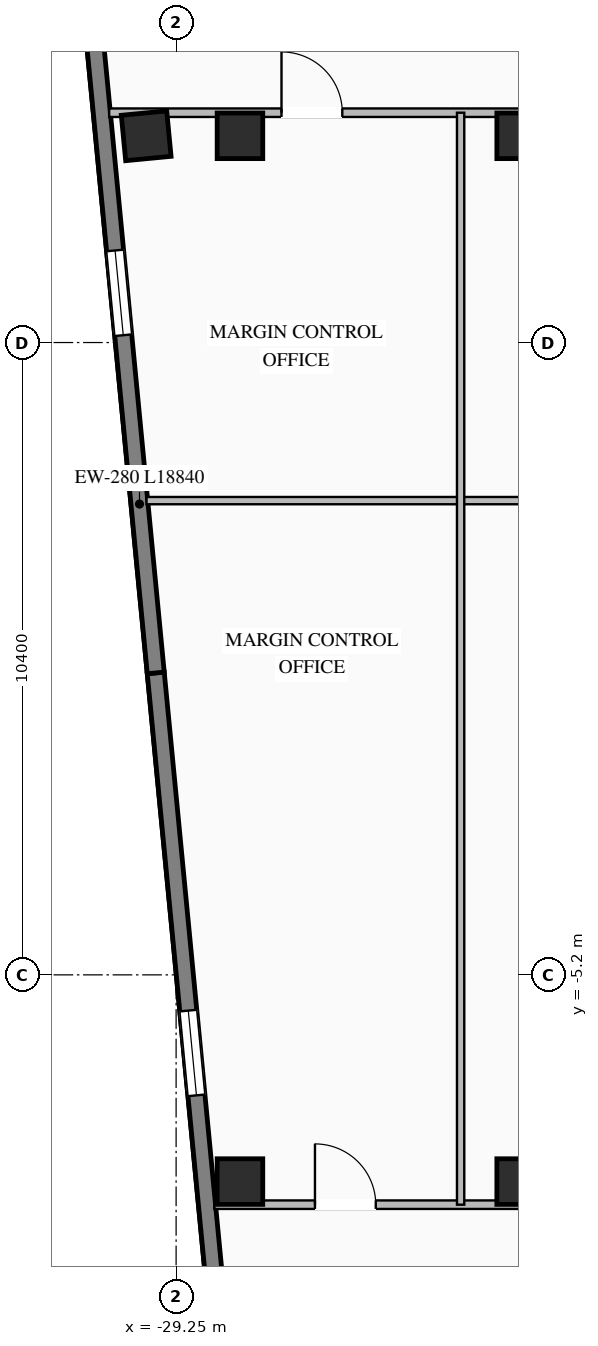
"""IFC4 building model, lengths in metres.
Left out: names, types, materials, properties, quantities, classifications, styles, units other than length and angle.
Written with IfcOpenShell. Run it as: python <this file> out.ifc"""

import sys

from ifc_helpers import new_model, si_unit, direction, frame, frame_2d, origin, origin_2d, place, context, subcontext, project, spatial, rectangle, i_section, extrude, element, fill, save


model = new_model("IFC4")
c1 = context("Model", 3, precision=1e-05, world=origin(), true_north=direction((0.0, 1.0)))
c2 = subcontext(c1, "Body", "Model", "MODEL_VIEW")
j1 = project(units=[si_unit("LENGTHUNIT", "METRE"), si_unit("PLANEANGLEUNIT", "RADIAN")], contexts=[c1])
p1 = place(None, origin())
s1 = spatial("IfcSite", under=j1, at=p1, CompositionType="ELEMENT")
p2 = place(p1, origin())
s2 = spatial("IfcBuilding", under=s1, at=p2, CompositionType="ELEMENT")
p3 = place(p2, frame((0.0, 0.0, 101.8)))
s3 = spatial("IfcBuildingStorey", under=s2, at=p3, CompositionType="ELEMENT", Elevation=101.8)
for number, where, z_axis, x_axis in (
    (1, (-23.6, -8.6, 0.0), (0.0, 0.0, 1.0), (1.0, 0.0, 0.0)),
    (2, (-23.6, 8.6, 0.0), (0.0, 0.0, 1.0), (1.0, 0.0, 0.0)),
    (3, (-28.2, -8.6, 0.0), (0.0, 0.0, 1.0), (1.0, 0.0, 0.0)),
    (4, (-28.2, 8.6, 0.0), (0.0, 0.0, 1.0), (1.0, 0.0, 0.0)),
    (5, (-29.742, 8.6, 0.0), (0.0, 0.0, 1.0), (0.995, 0.096, 0.0)),
):
    element("IfcColumn", number, at=place(p3, frame(where, z_axis=z_axis, x_axis=x_axis)), inside=s3, PredefinedType="COLUMN", context=c2, shape_type="SweptSolid", body=[
        extrude(i_section(OverallWidth=0.75, OverallDepth=0.75, WebThickness=0.03, FlangeThickness=0.044, at=origin_2d()), origin(), (0.0, 0.0, 1.0), 3.45),
    ])
p4 = place(p3, frame((-27.779, -18.987, 0.0), z_axis=(0.0, 0.0, 1.0), x_axis=(-0.095842534142, 0.995396508256, 0.0)))
e6 = element("IfcWall", 6, at=p4, inside=s3, PredefinedType="STANDARD", context=c2, shape_type="SweptSolid", body=[
    extrude(rectangle(XDim=18.84, YDim=0.28, at=frame_2d((9.42, 0.0))), origin(), (0.0, 0.0, 1.0), 3.25),
])
p5 = place(p4, frame((5.58, 0.0, 0.76)))
e7 = element("IfcOpeningElement", 7, at=p5, cuts=e6, PredefinedType="OPENING", context=c2, shape_type="SweptSolid", body=[
    extrude(rectangle(XDim=1.4, YDim=1.95, at=frame_2d((0.7, 0.975))), frame((0.0, 0.15, 0.0), z_axis=(0.0, -1.0, 0.0), x_axis=(1.0, 0.0, 0.0)), (0.0, 0.0, 1.0), 0.3),
])
p6 = place(p4, frame((11.86, 0.0, 0.76)))
e8 = element("IfcOpeningElement", 8, at=p6, cuts=e6, PredefinedType="OPENING", context=c2, shape_type="SweptSolid", body=[
    extrude(rectangle(XDim=1.4, YDim=1.95, at=frame_2d((0.7, 0.975))), frame((0.0, 0.15, 0.0), z_axis=(0.0, -1.0, 0.0), x_axis=(1.0, 0.0, 0.0)), (0.0, 0.0, 1.0), 0.3),
])
p7 = place(p3, frame((-29.585, -0.234, 0.0), z_axis=(0.0, 0.0, 1.0), x_axis=(-0.095841297881, 0.99539662729, 0.0)))
e9 = element("IfcWall", 9, at=p7, inside=s3, PredefinedType="STANDARD", context=c2, shape_type="SweptSolid", body=[
    extrude(rectangle(XDim=18.84, YDim=0.28, at=frame_2d((9.42, 0.0))), origin(), (0.0, 0.0, 1.0), 3.25),
])
p8 = place(p7, frame((5.58, 0.0, 0.76)))
e10 = element("IfcOpeningElement", 10, at=p8, cuts=e9, PredefinedType="OPENING", context=c2, shape_type="SweptSolid", body=[
    extrude(rectangle(XDim=1.4, YDim=1.95, at=frame_2d((0.7, 0.975))), frame((0.0, 0.15, 0.0), z_axis=(0.0, -1.0, 0.0), x_axis=(1.0, 0.0, 0.0)), (0.0, 0.0, 1.0), 0.3),
])
p9 = place(p7, frame((12.41, 0.0, 0.76)))
e11 = element("IfcOpeningElement", 11, at=p9, cuts=e9, PredefinedType="OPENING", context=c2, shape_type="SweptSolid", body=[
    extrude(rectangle(XDim=1.4, YDim=1.95, at=frame_2d((0.7, 0.975))), frame((0.0, 0.15, 0.0), z_axis=(0.0, -1.0, 0.0), x_axis=(1.0, 0.0, 0.0)), (0.0, 0.0, 1.0), 0.3),
])
p10 = place(p3, frame((-30.351, 8.98, 0.0), z_axis=(0.0, 0.0, 1.0), x_axis=(1.0, 0.0, 0.0)))
e12 = element("IfcWall", 12, at=p10, inside=s3, PredefinedType="STANDARD", context=c2, shape_type="SweptSolid", body=[
    extrude(rectangle(XDim=11.301, YDim=0.14, at=frame_2d((5.651, 0.0))), origin(), (0.0, 0.0, 1.0), 3.25),
])
p11 = place(p10, frame((2.834, 0.0, 0.0)))
e13 = element("IfcOpeningElement", 13, at=p11, cuts=e12, PredefinedType="OPENING", context=c2, shape_type="SweptSolid", body=[
    extrude(rectangle(XDim=1.0, YDim=2.08, at=frame_2d((0.5, 1.04))), frame((0.0, 0.08, 0.0), z_axis=(0.0, -1.0, 0.0), x_axis=(1.0, 0.0, 0.0)), (0.0, 0.0, 1.0), 0.16),
])
p12 = place(p10, frame((7.911, 0.0, 0.0)))
e14 = element("IfcOpeningElement", 14, at=p12, cuts=e12, PredefinedType="OPENING", context=c2, shape_type="SweptSolid", body=[
    extrude(rectangle(XDim=1.0, YDim=2.08, at=frame_2d((0.5, 1.04))), frame((0.0, 0.08, 0.0), z_axis=(0.0, -1.0, 0.0), x_axis=(1.0, 0.0, 0.0)), (0.0, 0.0, 1.0), 0.16),
])
p13 = place(p3, frame((-28.622, -8.98, 0.0), z_axis=(0.0, 0.0, 1.0), x_axis=(1.0, 0.0, 0.0)))
e15 = element("IfcWall", 15, at=p13, inside=s3, PredefinedType="STANDARD", context=c2, shape_type="SweptSolid", body=[
    extrude(rectangle(XDim=9.572, YDim=0.14, at=frame_2d((4.786, 0.0))), origin(), (0.0, 0.0, 1.0), 3.25),
])
p14 = place(p13, frame((1.656, 0.0, 0.0)))
e16 = element("IfcOpeningElement", 16, at=p14, cuts=e15, PredefinedType="OPENING", context=c2, shape_type="SweptSolid", body=[
    extrude(rectangle(XDim=1.0, YDim=2.08, at=frame_2d((0.5, 1.04))), frame((0.0, 0.08, 0.0), z_axis=(0.0, -1.0, 0.0), x_axis=(1.0, 0.0, 0.0)), (0.0, 0.0, 1.0), 0.16),
])
p15 = place(p13, frame((6.181, 0.0, 0.0)))
e17 = element("IfcOpeningElement", 17, at=p15, cuts=e15, PredefinedType="OPENING", context=c2, shape_type="SweptSolid", body=[
    extrude(rectangle(XDim=1.0, YDim=2.08, at=frame_2d((0.5, 1.04))), frame((0.0, 0.08, 0.0), z_axis=(0.0, -1.0, 0.0), x_axis=(1.0, 0.0, 0.0)), (0.0, 0.0, 1.0), 0.16),
])
p16 = place(p3, frame((-29.737, 2.6, 0.0), z_axis=(0.0, 0.0, 1.0), x_axis=(1.0, 0.0, 0.0)))
e18 = element("IfcWall", 18, at=p16, inside=s3, PredefinedType="STANDARD", context=c2, shape_type="SweptSolid", body=[
    extrude(rectangle(XDim=10.687, YDim=0.12, at=frame_2d((5.344, 0.0))), origin(), (0.0, 0.0, 1.0), 3.25),
])
p17 = place(p3, frame((-24.571, -8.98, 0.0), z_axis=(0.0, 0.0, 1.0), x_axis=(0.0, 1.0, 0.0)))
e19 = element("IfcWall", 19, at=p17, inside=s3, PredefinedType="STANDARD", context=c2, shape_type="SweptSolid", body=[
    extrude(rectangle(XDim=17.96, YDim=0.12, at=frame_2d((8.98, 0.0))), origin(), (0.0, 0.0, 1.0), 3.25),
])
p18 = place(p6, origin())
e20 = element("IfcWindow", 20, at=p18, inside=s3, PartitioningType="SINGLE_PANEL", PredefinedType="WINDOW", context=c2, shape_type="SweptSolid", body=[
    extrude(rectangle(XDim=1.4, YDim=1.95, at=frame_2d((0.7, 0.975))), frame((0.0, 0.03, 0.0), z_axis=(0.0, -1.0, 0.0), x_axis=(1.0, 0.0, 0.0)), (0.0, 0.0, 1.0), 0.06),
])
fill(e8, e20)
p19 = place(p8, origin())
e21 = element("IfcWindow", 21, at=p19, inside=s3, PartitioningType="SINGLE_PANEL", PredefinedType="WINDOW", context=c2, shape_type="SweptSolid", body=[
    extrude(rectangle(XDim=1.4, YDim=1.95, at=frame_2d((0.7, 0.975))), frame((0.0, 0.03, 0.0), z_axis=(0.0, -1.0, 0.0), x_axis=(1.0, 0.0, 0.0)), (0.0, 0.0, 1.0), 0.06),
])
fill(e10, e21)
p20 = place(p11, origin())
e22 = element("IfcDoor", 22, at=p20, inside=s3, OperationType="SINGLE_SWING_LEFT", PredefinedType="DOOR", context=c2, shape_type="SweptSolid", body=[
    extrude(rectangle(XDim=1.0, YDim=2.08, at=frame_2d((0.5, 1.04))), frame((0.0, 0.025, 0.0), z_axis=(0.0, -1.0, 0.0), x_axis=(1.0, 0.0, 0.0)), (0.0, 0.0, 1.0), 0.05),
])
fill(e13, e22)
p21 = place(p14, origin())
e23 = element("IfcDoor", 23, at=p21, inside=s3, OperationType="SINGLE_SWING_LEFT", PredefinedType="DOOR", context=c2, shape_type="SweptSolid", body=[
    extrude(rectangle(XDim=1.0, YDim=2.08, at=frame_2d((0.5, 1.04))), frame((0.0, 0.025, 0.0), z_axis=(0.0, -1.0, 0.0), x_axis=(1.0, 0.0, 0.0)), (0.0, 0.0, 1.0), 0.05),
])
fill(e16, e23)
save(model, sys.argv[1])
